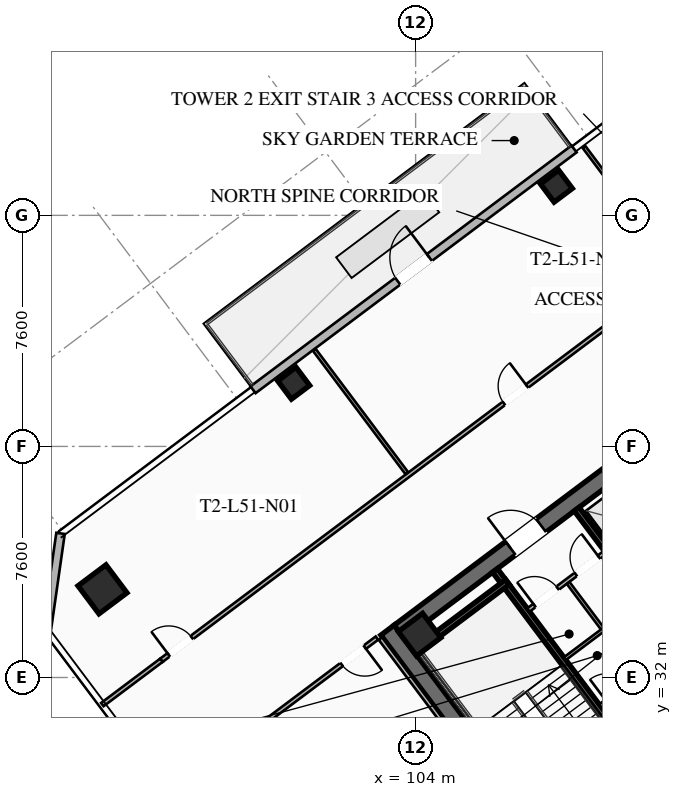
"""IFC4 building model, lengths in metres.
Left out: names, types, materials, properties, quantities, classifications, styles, units other than length and angle.
Written with IfcOpenShell. Run it as: python <this file> out.ifc"""

import sys

from ifc_helpers import new_model, si_unit, direction, frame, frame_2d, origin, origin_2d, place, context, subcontext, project, spatial, rectangle, hollow_rectangle, extrude, element, fill, save


model = new_model("IFC4")
c1 = context("Model", 3, precision=1e-05, world=origin(), true_north=direction((0.0, 1.0)))
c2 = subcontext(c1, "Body", "Model", "MODEL_VIEW")
j1 = project(units=[si_unit("LENGTHUNIT", "METRE"), si_unit("PLANEANGLEUNIT", "RADIAN")], contexts=[c1])
p1 = place(None, origin())
s1 = spatial("IfcSite", under=j1, at=p1, CompositionType="ELEMENT")
p2 = place(p1, origin())
s2 = spatial("IfcBuilding", under=s1, at=p2, CompositionType="ELEMENT")
p3 = place(p2, frame((0.0, 0.0, 188.95)))
s3 = spatial("IfcBuildingStorey", under=s2, at=p3, CompositionType="ELEMENT", Elevation=188.95)
p4 = place(p3, frame((112.436, 21.077, 0.0), z_axis=(0.0, 0.0, 1.0), x_axis=(-0.600005007985, 0.799996243986, 0.0)))
e1 = element("IfcWall", 1, at=p4, inside=s3, PredefinedType="SHEAR", context=c2, shape_type="SweptSolid", body=[
    extrude(rectangle(XDim=15.6, YDim=0.55, at=frame_2d((7.8, 0.0))), origin(), (0.0, 0.0, 1.0), 3.55),
])
p5 = place(p3, frame((103.461, 33.502, 0.0), z_axis=(0.0, 0.0, 1.0), x_axis=(0.799998054672, 0.600002593761, 0.0)))
e2 = element("IfcWall", 2, at=p5, inside=s3, PredefinedType="SHEAR", context=c2, shape_type="SweptSolid", body=[
    extrude(rectangle(XDim=15.06, YDim=0.55, at=frame_2d((7.53, 0.0))), origin(), (0.0, 0.0, 1.0), 3.55),
])
p6 = place(p5, frame((4.58, 0.0, 0.0)))
e3 = element("IfcOpeningElement", 3, at=p6, cuts=e2, PredefinedType="OPENING", context=c2, shape_type="SweptSolid", body=[
    extrude(rectangle(XDim=1.25, YDim=2.25, at=frame_2d((0.625, 1.125))), frame((0.0, 0.285, 0.0), z_axis=(0.0, -1.0, 0.0), x_axis=(1.0, 0.0, 0.0)), (0.0, 0.0, 1.0), 0.57),
])
p7 = place(p5, frame((9.63, 0.0, 0.0)))
e4 = element("IfcOpeningElement", 4, at=p7, cuts=e2, PredefinedType="OPENING", context=c2, shape_type="SweptSolid", body=[
    extrude(rectangle(XDim=1.25, YDim=2.25, at=frame_2d((0.625, 1.125))), frame((0.0, 0.285, 0.0), z_axis=(0.0, -1.0, 0.0), x_axis=(1.0, 0.0, 0.0)), (0.0, 0.0, 1.0), 0.57),
])
p8 = place(p3, frame((104.13, 33.41, 0.0), z_axis=(0.0, 0.0, 1.0), x_axis=(0.799999996291, 0.600000004945, 0.0)))
e5 = element("IfcColumn", 5, at=p8, inside=s3, PredefinedType="COLUMN", context=c2, shape_type="SweptSolid", body=[
    extrude(hollow_rectangle(XDim=1.0, YDim=1.0, WallThickness=0.04, at=origin_2d()), origin(), (0.0, 0.0, 1.0), 3.37),
])
p9 = place(p3, frame((93.7, 34.9, 0.0), z_axis=(0.0, 0.0, 1.0), x_axis=(0.799999996291, 0.600000004945, 0.0)))
e6 = element("IfcColumn", 6, at=p9, inside=s3, PredefinedType="COLUMN", context=c2, shape_type="SweptSolid", body=[
    extrude(hollow_rectangle(XDim=1.15, YDim=1.15, WallThickness=0.045, at=origin_2d()), origin(), (0.0, 0.0, 1.0), 3.37),
])
for number, where, z_axis, x_axis in (
    (7, (108.63, 48.16, 0.0), (0.0, 0.0, 1.0), (0.8, 0.6, 0.0)),
    (8, (99.99, 41.68, 0.0), (0.0, 0.0, 1.0), (0.8, 0.6, 0.0)),
):
    element("IfcColumn", number, at=place(p3, frame(where, z_axis=z_axis, x_axis=x_axis)), inside=s3, PredefinedType="COLUMN", context=c2, shape_type="SweptSolid", body=[
        extrude(hollow_rectangle(XDim=0.75, YDim=0.75, WallThickness=0.032, at=origin_2d()), origin(), (0.0, 0.0, 1.0), 3.37),
    ])
p10 = place(p3, frame((98.652, 41.464, 0.0), z_axis=(0.0, 0.0, 1.0), x_axis=(0.799997780501, 0.60000295932, 0.0)))
e9 = element("IfcWall", 9, at=p10, inside=s3, PredefinedType="SOLIDWALL", context=c2, shape_type="SweptSolid", body=[
    extrude(rectangle(XDim=13.2, YDim=0.28, at=frame_2d((6.6, 0.0))), origin(), (0.0, 0.0, 1.0), 3.37),
])
p11 = place(p10, frame((5.95, 0.0, 0.0)))
e10 = element("IfcOpeningElement", 10, at=p11, cuts=e9, PredefinedType="OPENING", context=c2, shape_type="SweptSolid", body=[
    extrude(rectangle(XDim=1.3, YDim=2.15, at=frame_2d((0.65, 1.075))), frame((0.0, 0.15, 0.0), z_axis=(0.0, -1.0, 0.0), x_axis=(1.0, 0.0, 0.0)), (0.0, 0.0, 1.0), 0.3),
])
p12 = place(p3, frame((91.86, 33.52, 0.0), z_axis=(0.0, 0.0, 1.0), x_axis=(0.141410847992, 0.989950994782, 0.0)))
e11 = element("IfcWall", 11, at=p12, inside=s3, PredefinedType="SOLIDWALL", context=c2, shape_type="SweptSolid", body=[
    extrude(rectangle(XDim=3.253, YDim=0.28, at=frame_2d((1.626, 0.0))), origin(), (0.0, 0.0, 1.0), 3.37),
])
p13 = place(p3, frame((111.44, 29.08, 0.0), z_axis=(0.0, 0.0, 1.0), x_axis=(-0.59999029481, 0.8000072788, 0.0)))
e12 = element("IfcWall", 12, at=p13, inside=s3, PredefinedType="SHEAR", context=c2, shape_type="SweptSolid", body=[
    extrude(rectangle(XDim=8.05, YDim=0.2, at=frame_2d((4.025, 0.0))), origin(), (0.0, 0.0, 1.0), 3.37),
])
p14 = place(p13, frame((0.45, 0.0, 0.0)))
e13 = element("IfcOpeningElement", 13, at=p14, cuts=e12, PredefinedType="OPENING", context=c2, shape_type="SweptSolid", body=[
    extrude(rectangle(XDim=1.15, YDim=2.2, at=frame_2d((0.575, 1.1))), frame((0.0, 0.11, 0.0), z_axis=(0.0, -1.0, 0.0), x_axis=(1.0, 0.0, 0.0)), (0.0, 0.0, 1.0), 0.22),
])
p15 = place(p3, frame((103.956, 32.842, 0.0), z_axis=(0.0, 0.0, 1.0), x_axis=(0.800015298837, 0.599979601008, 0.0)))
e14 = element("IfcWall", 14, at=p15, inside=s3, PredefinedType="SHEAR", context=c2, shape_type="SweptSolid", body=[
    extrude(rectangle(XDim=3.83, YDim=0.2, at=frame_2d((1.915, 0.0))), origin(), (0.0, 0.0, 1.0), 3.37),
])
p16 = place(p3, frame((117.998, 25.936, 0.0), z_axis=(0.0, 0.0, 1.0), x_axis=(-0.600002693989, 0.799997979501, 0.0)))
e15 = element("IfcWall", 15, at=p16, inside=s3, PredefinedType="SHEAR", context=c2, shape_type="SweptSolid", body=[
    extrude(rectangle(XDim=14.5, YDim=0.2, at=frame_2d((7.25, 0.0))), origin(), (0.0, 0.0, 1.0), 3.37),
])
p17 = place(p3, frame((110.104, 31.028, 0.0), z_axis=(0.0, 0.0, 1.0), x_axis=(0.800018601094, 0.59997519774, 0.0)))
e16 = element("IfcWall", 16, at=p17, inside=s3, PredefinedType="SOLIDWALL", context=c2, shape_type="SweptSolid", body=[
    extrude(rectangle(XDim=3.15, YDim=0.22, at=frame_2d((1.575, 0.0))), origin(), (0.0, 0.0, 1.0), 2.723),
])
p18 = place(p17, frame((0.25, 0.0, 0.0)))
e17 = element("IfcOpeningElement", 17, at=p18, cuts=e16, PredefinedType="OPENING", context=c2, shape_type="SweptSolid", body=[
    extrude(rectangle(XDim=0.95, YDim=2.05, at=frame_2d((0.475, 1.025))), frame((0.0, 0.12, 0.0), z_axis=(0.0, -1.0, 0.0), x_axis=(1.0, 0.0, 0.0)), (0.0, 0.0, 1.0), 0.24),
])
p19 = place(p17, frame((1.95, 0.0, 0.0)))
e18 = element("IfcOpeningElement", 18, at=p19, cuts=e16, PredefinedType="OPENING", context=c2, shape_type="SweptSolid", body=[
    extrude(rectangle(XDim=0.95, YDim=2.05, at=frame_2d((0.475, 1.025))), frame((0.0, 0.12, 0.0), z_axis=(0.0, -1.0, 0.0), x_axis=(1.0, 0.0, 0.0)), (0.0, 0.0, 1.0), 0.24),
])
p20 = place(p3, frame((107.71, 34.22, 0.0), z_axis=(0.0, 0.0, 1.0), x_axis=(0.799981399002, 0.60002480053, 0.0)))
e19 = element("IfcWall", 19, at=p20, inside=s3, PredefinedType="PARTITIONING", context=c2, shape_type="SweptSolid", body=[
    extrude(rectangle(XDim=3.15, YDim=0.135, at=frame_2d((1.575, 0.0))), origin(), (0.0, 0.0, 1.0), 2.723),
])
p21 = place(p20, frame((0.25, 0.0, 0.0)))
e20 = element("IfcOpeningElement", 20, at=p21, cuts=e19, PredefinedType="OPENING", context=c2, shape_type="SweptSolid", body=[
    extrude(rectangle(XDim=0.95, YDim=2.05, at=frame_2d((0.475, 1.025))), frame((0.0, 0.077, 0.0), z_axis=(0.0, -1.0, 0.0), x_axis=(1.0, 0.0, 0.0)), (0.0, 0.0, 1.0), 0.155),
])
p22 = place(p20, frame((1.95, 0.0, 0.0)))
e21 = element("IfcOpeningElement", 21, at=p22, cuts=e19, PredefinedType="OPENING", context=c2, shape_type="SweptSolid", body=[
    extrude(rectangle(XDim=0.95, YDim=2.05, at=frame_2d((0.475, 1.025))), frame((0.0, 0.077, 0.0), z_axis=(0.0, -1.0, 0.0), x_axis=(1.0, 0.0, 0.0)), (0.0, 0.0, 1.0), 0.155),
])
p23 = place(p3, frame((111.296, 32.072, 0.0), z_axis=(0.0, 0.0, 1.0), x_axis=(-0.59995887973, 0.800030838552, 0.0)))
e22 = element("IfcWall", 22, at=p23, inside=s3, PredefinedType="PARTITIONING", context=c2, shape_type="SweptSolid", body=[
    extrude(rectangle(XDim=3.8, YDim=0.11, at=frame_2d((1.9, 0.0))), origin(), (0.0, 0.0, 1.0), 2.723),
])
p24 = place(p3, frame((108.91, 32.62, 0.0), z_axis=(0.0, 0.0, 1.0), x_axis=(0.800018601094, 0.59997519774, 0.0)))
e23 = element("IfcWall", 23, at=p24, inside=s3, PredefinedType="PARTITIONING", context=c2, shape_type="SweptSolid", body=[
    extrude(rectangle(XDim=3.15, YDim=0.11, at=frame_2d((1.575, 0.0))), origin(), (0.0, 0.0, 1.0), 2.723),
])
p25 = place(p3, frame((95.638, 32.566, 0.0), z_axis=(0.0, 0.0, 1.0), x_axis=(0.8, 0.6, 0.0)))
e24 = element("IfcWall", 24, at=p25, inside=s3, PredefinedType="PARTITIONING", context=c2, shape_type="SweptSolid", body=[
    extrude(rectangle(XDim=28.7, YDim=0.135, at=frame_2d((14.35, 0.0))), origin(), (0.0, 0.0, 1.0), 2.723),
])
p26 = place(p25, frame((0.3, 0.0, 0.0)))
e25 = element("IfcOpeningElement", 25, at=p26, cuts=e24, PredefinedType="OPENING", context=c2, shape_type="SweptSolid", body=[
    extrude(rectangle(XDim=0.95, YDim=2.05, at=frame_2d((0.475, 1.025))), frame((0.0, 0.077, 0.0), z_axis=(0.0, -1.0, 0.0), x_axis=(1.0, 0.0, 0.0)), (0.0, 0.0, 1.0), 0.155),
])
p27 = place(p25, frame((14.083, 0.0, 0.0)))
e26 = element("IfcOpeningElement", 26, at=p27, cuts=e24, PredefinedType="OPENING", context=c2, shape_type="SweptSolid", body=[
    extrude(rectangle(XDim=0.95, YDim=2.05, at=frame_2d((0.475, 1.025))), frame((0.0, 0.077, 0.0), z_axis=(0.0, -1.0, 0.0), x_axis=(1.0, 0.0, 0.0)), (0.0, 0.0, 1.0), 0.155),
])
p28 = place(p25, frame((27.45, 0.0, 0.0)))
e27 = element("IfcOpeningElement", 27, at=p28, cuts=e24, PredefinedType="OPENING", context=c2, shape_type="SweptSolid", body=[
    extrude(rectangle(XDim=0.95, YDim=2.05, at=frame_2d((0.475, 1.025))), frame((0.0, 0.077, 0.0), z_axis=(0.0, -1.0, 0.0), x_axis=(1.0, 0.0, 0.0)), (0.0, 0.0, 1.0), 0.155),
])
p29 = place(p3, frame((93.694, 31.108, 0.0), z_axis=(0.0, 0.0, 1.0), x_axis=(0.799975885537, 0.600032151272, 0.0)))
e28 = element("IfcWall", 28, at=p29, inside=s3, PredefinedType="PARTITIONING", context=c2, shape_type="SweptSolid", body=[
    extrude(rectangle(XDim=2.43, YDim=0.135, at=frame_2d((1.215, 0.0))), origin(), (0.0, 0.0, 1.0), 2.723),
])
p30 = place(p3, frame((103.71, 38.72, 0.0), z_axis=(0.0, 0.0, 1.0), x_axis=(-0.599984620597, 0.800011534321, 0.0)))
e29 = element("IfcWall", 29, at=p30, inside=s3, PredefinedType="PARTITIONING", context=c2, shape_type="SweptSolid", body=[
    extrude(rectangle(XDim=5.08, YDim=0.11, at=frame_2d((2.54, 0.0))), origin(), (0.0, 0.0, 1.0), 2.723),
])
p31 = place(p3, frame((112.59, 45.38, 0.0), z_axis=(0.0, 0.0, 1.0), x_axis=(-0.599992310844, 0.800005766809, 0.0)))
e30 = element("IfcWall", 30, at=p31, inside=s3, PredefinedType="PARTITIONING", context=c2, shape_type="SweptSolid", body=[
    extrude(rectangle(XDim=5.08, YDim=0.11, at=frame_2d((2.54, 0.0))), origin(), (0.0, 0.0, 1.0), 2.723),
])
p32 = place(p3, frame((131.87, 32.09, 0.0), z_axis=(0.0, 0.0, 1.0), x_axis=(-0.800003062365, -0.599995916825, 0.0)))
e31 = element("IfcWall", 31, at=p32, inside=s3, PredefinedType="PARTITIONING", context=c2, shape_type="SweptSolid", body=[
    extrude(rectangle(XDim=28.7, YDim=0.135, at=frame_2d((14.35, 0.0))), origin(), (0.0, 0.0, 1.0), 2.723),
])
p33 = place(p32, frame((27.37, 0.0, 0.0)))
e32 = element("IfcOpeningElement", 32, at=p33, cuts=e31, PredefinedType="OPENING", context=c2, shape_type="SweptSolid", body=[
    extrude(rectangle(XDim=0.95, YDim=2.05, at=frame_2d((0.475, 1.025))), frame((0.0, 0.077, 0.0), z_axis=(0.0, -1.0, 0.0), x_axis=(1.0, 0.0, 0.0)), (0.0, 0.0, 1.0), 0.155),
])
p34 = place(p32, frame((13.638, 0.0, 0.0)))
e33 = element("IfcOpeningElement", 33, at=p34, cuts=e31, PredefinedType="OPENING", context=c2, shape_type="SweptSolid", body=[
    extrude(rectangle(XDim=0.95, YDim=2.05, at=frame_2d((0.475, 1.025))), frame((0.0, 0.077, 0.0), z_axis=(0.0, -1.0, 0.0), x_axis=(1.0, 0.0, 0.0)), (0.0, 0.0, 1.0), 0.155),
])
p35 = place(p32, frame((0.38, 0.0, 0.0)))
e34 = element("IfcOpeningElement", 34, at=p35, cuts=e31, PredefinedType="OPENING", context=c2, shape_type="SweptSolid", body=[
    extrude(rectangle(XDim=0.95, YDim=2.05, at=frame_2d((0.475, 1.025))), frame((0.0, 0.077, 0.0), z_axis=(0.0, -1.0, 0.0), x_axis=(1.0, 0.0, 0.0)), (0.0, 0.0, 1.0), 0.155),
])
p36 = place(p3, frame((112.104, 20.928, 0.0), z_axis=(0.0, 0.0, 1.0), x_axis=(-0.599994940075, 0.800003794918, 0.0)))
e35 = element("IfcWall", 35, at=p36, inside=s3, PredefinedType="PARTITIONING", context=c2, shape_type="SweptSolid", body=[
    extrude(rectangle(XDim=15.44, YDim=0.135, at=frame_2d((7.72, 0.0))), origin(), (0.0, 0.0, 1.0), 2.723),
])
p37 = place(p3, frame((102.728, 33.296, 0.0), z_axis=(0.0, 0.0, 1.0), x_axis=(-0.800013722153, -0.59998170336, 0.0)))
e36 = element("IfcWall", 36, at=p37, inside=s3, PredefinedType="PARTITIONING", context=c2, shape_type="SweptSolid", body=[
    extrude(rectangle(XDim=8.54, YDim=0.135, at=frame_2d((4.27, 0.0))), origin(), (0.0, 0.0, 1.0), 2.723),
])
p38 = place(p37, frame((0.5, 0.0, 0.0)))
e37 = element("IfcOpeningElement", 37, at=p38, cuts=e36, PredefinedType="OPENING", context=c2, shape_type="SweptSolid", body=[
    extrude(rectangle(XDim=0.95, YDim=2.05, at=frame_2d((0.475, 1.025))), frame((0.0, 0.077, 0.0), z_axis=(0.0, -1.0, 0.0), x_axis=(1.0, 0.0, 0.0)), (0.0, 0.0, 1.0), 0.155),
])
p39 = place(p11, origin())
e38 = element("IfcDoor", 38, at=p39, inside=s3, OperationType="SINGLE_SWING_RIGHT", PredefinedType="DOOR", context=c2, shape_type="SweptSolid", body=[
    extrude(rectangle(XDim=1.3, YDim=2.15, at=frame_2d((0.65, 1.075))), frame((0.0, 0.025, 0.0), z_axis=(0.0, -1.0, 0.0), x_axis=(1.0, 0.0, 0.0)), (0.0, 0.0, 1.0), 0.05),
])
fill(e10, e38)
p40 = place(p6, origin())
e39 = element("IfcDoor", 39, at=p40, inside=s3, OperationType="SINGLE_SWING_LEFT", PredefinedType="DOOR", context=c2, shape_type="SweptSolid", body=[
    extrude(rectangle(XDim=1.25, YDim=2.25, at=frame_2d((0.625, 1.125))), frame((0.0, 0.025, 0.0), z_axis=(0.0, -1.0, 0.0), x_axis=(1.0, 0.0, 0.0)), (0.0, 0.0, 1.0), 0.05),
])
fill(e3, e39)
p41 = place(p21, origin())
e40 = element("IfcDoor", 40, at=p41, inside=s3, OperationType="SINGLE_SWING_LEFT", PredefinedType="DOOR", context=c2, shape_type="SweptSolid", body=[
    extrude(rectangle(XDim=0.95, YDim=2.05, at=frame_2d((0.475, 1.025))), frame((0.0, 0.025, 0.0), z_axis=(0.0, -1.0, 0.0), x_axis=(1.0, 0.0, 0.0)), (0.0, 0.0, 1.0), 0.05),
])
fill(e20, e40)
p42 = place(p22, origin())
e41 = element("IfcDoor", 41, at=p42, inside=s3, OperationType="SINGLE_SWING_RIGHT", PredefinedType="DOOR", context=c2, shape_type="SweptSolid", body=[
    extrude(rectangle(XDim=0.95, YDim=2.05, at=frame_2d((0.475, 1.025))), frame((0.0, 0.025, 0.0), z_axis=(0.0, -1.0, 0.0), x_axis=(1.0, 0.0, 0.0)), (0.0, 0.0, 1.0), 0.05),
])
fill(e21, e41)
p43 = place(p26, origin())
e42 = element("IfcDoor", 42, at=p43, inside=s3, OperationType="SINGLE_SWING_LEFT", PredefinedType="DOOR", context=c2, shape_type="SweptSolid", body=[
    extrude(rectangle(XDim=0.95, YDim=2.05, at=frame_2d((0.475, 1.025))), frame((0.0, 0.025, 0.0), z_axis=(0.0, -1.0, 0.0), x_axis=(1.0, 0.0, 0.0)), (0.0, 0.0, 1.0), 0.05),
])
fill(e25, e42)
p44 = place(p27, origin())
e43 = element("IfcDoor", 43, at=p44, inside=s3, OperationType="SINGLE_SWING_RIGHT", PredefinedType="DOOR", context=c2, shape_type="SweptSolid", body=[
    extrude(rectangle(XDim=0.95, YDim=2.05, at=frame_2d((0.475, 1.025))), frame((0.0, 0.025, 0.0), z_axis=(0.0, -1.0, 0.0), x_axis=(1.0, 0.0, 0.0)), (0.0, 0.0, 1.0), 0.05),
])
fill(e26, e43)
p45 = place(p38, origin())
e44 = element("IfcDoor", 44, at=p45, inside=s3, OperationType="SINGLE_SWING_LEFT", PredefinedType="DOOR", context=c2, shape_type="SweptSolid", body=[
    extrude(rectangle(XDim=0.95, YDim=2.05, at=frame_2d((0.475, 1.025))), frame((0.0, 0.025, 0.0), z_axis=(0.0, -1.0, 0.0), x_axis=(1.0, 0.0, 0.0)), (0.0, 0.0, 1.0), 0.05),
])
fill(e37, e44)
save(model, sys.argv[1])
